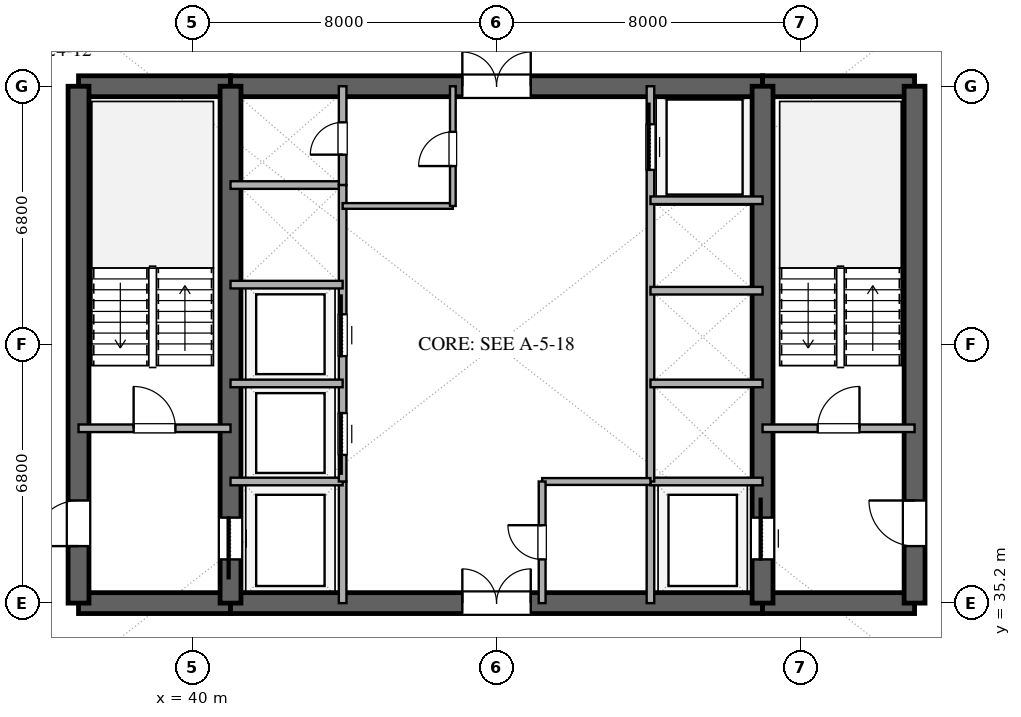
"""IFC4 building model, lengths in metres.
Left out: names, types, materials, properties, quantities, classifications, styles, units other than length and angle.
Written with IfcOpenShell. Run it as: python <this file> out.ifc"""

import sys

from ifc_helpers import new_model, si_unit, direction, frame, frame_2d, origin, place, context, subcontext, project, spatial, rectangle, extrude, element, fill, save


model = new_model("IFC4")
c1 = context("Model", 3, precision=1e-05, world=origin(), true_north=direction((0.0, 1.0)))
c2 = subcontext(c1, "Body", "Model", "MODEL_VIEW")
j1 = project(units=[si_unit("LENGTHUNIT", "METRE"), si_unit("PLANEANGLEUNIT", "RADIAN")], contexts=[c1])
p1 = place(None, origin())
s1 = spatial("IfcSite", under=j1, at=p1, CompositionType="ELEMENT")
p2 = place(p1, origin())
s2 = spatial("IfcBuilding", under=s1, at=p2, CompositionType="ELEMENT")
p3 = place(p2, frame((0.0, 0.0, 98.4)))
s3 = spatial("IfcBuildingStorey", under=s2, at=p3, CompositionType="ELEMENT", Elevation=98.4)
p4 = place(p3, frame((37.0, 35.2, 0.0), z_axis=(0.0, 0.0, 1.0), x_axis=(1.0, 0.0, 0.0)))
e1 = element("IfcWall", 1, at=p4, inside=s3, PredefinedType="SHEAR", context=c2, shape_type="SweptSolid", body=[
    extrude(rectangle(XDim=4.0, YDim=0.55, at=frame_2d((2.0, 0.0))), origin(), (0.0, 0.0, 1.0), 3.38),
])
p5 = place(p3, frame((41.0, 35.2, 0.0), z_axis=(0.0, 0.0, 1.0), x_axis=(1.0, 0.0, 0.0)))
e2 = element("IfcWall", 2, at=p5, inside=s3, PredefinedType="SHEAR", context=c2, shape_type="SweptSolid", body=[
    extrude(rectangle(XDim=14.0, YDim=0.55, at=frame_2d((7.0, 0.0))), origin(), (0.0, 0.0, 1.0), 3.38),
])
p6 = place(p5, frame((6.1, 0.0, 0.0)))
e3 = element("IfcOpeningElement", 3, at=p6, cuts=e2, PredefinedType="OPENING", context=c2, shape_type="SweptSolid", body=[
    extrude(rectangle(XDim=1.8, YDim=2.25, at=frame_2d((0.9, 1.125))), frame((0.0, 0.285, 0.0), z_axis=(0.0, -1.0, 0.0), x_axis=(1.0, 0.0, 0.0)), (0.0, 0.0, 1.0), 0.57),
])
for number, where, z_axis, x_axis in (
    (4, (55.0, 35.2, 0.0), (0.0, 0.0, 1.0), (1.0, 0.0, 0.0)),
    (5, (37.0, 48.8, 0.0), (0.0, 0.0, 1.0), (1.0, 0.0, 0.0)),
):
    element("IfcWall", number, at=place(p3, frame(where, z_axis=z_axis, x_axis=x_axis)), inside=s3, PredefinedType="SHEAR", context=c2, shape_type="SweptSolid", body=[
        extrude(rectangle(XDim=4.0, YDim=0.55, at=frame_2d((2.0, 0.0))), origin(), (0.0, 0.0, 1.0), 3.38),
    ])
p7 = place(p3, frame((41.0, 48.8, 0.0), z_axis=(0.0, 0.0, 1.0), x_axis=(1.0, 0.0, 0.0)))
e6 = element("IfcWall", 6, at=p7, inside=s3, PredefinedType="SHEAR", context=c2, shape_type="SweptSolid", body=[
    extrude(rectangle(XDim=14.0, YDim=0.55, at=frame_2d((7.0, 0.0))), origin(), (0.0, 0.0, 1.0), 3.38),
])
p8 = place(p7, frame((6.1, 0.0, 0.0)))
e7 = element("IfcOpeningElement", 7, at=p8, cuts=e6, PredefinedType="OPENING", context=c2, shape_type="SweptSolid", body=[
    extrude(rectangle(XDim=1.8, YDim=2.25, at=frame_2d((0.9, 1.125))), frame((0.0, 0.285, 0.0), z_axis=(0.0, -1.0, 0.0), x_axis=(1.0, 0.0, 0.0)), (0.0, 0.0, 1.0), 0.57),
])
p9 = place(p3, frame((55.0, 48.8, 0.0), z_axis=(0.0, 0.0, 1.0), x_axis=(1.0, 0.0, 0.0)))
e8 = element("IfcWall", 8, at=p9, inside=s3, PredefinedType="SHEAR", context=c2, shape_type="SweptSolid", body=[
    extrude(rectangle(XDim=4.0, YDim=0.55, at=frame_2d((2.0, 0.0))), origin(), (0.0, 0.0, 1.0), 3.38),
])
p10 = place(p3, frame((37.0, 35.2, 0.0), z_axis=(0.0, 0.0, 1.0), x_axis=(0.0, 1.0, 0.0)))
e9 = element("IfcWall", 9, at=p10, inside=s3, PredefinedType="SHEAR", context=c2, shape_type="SweptSolid", body=[
    extrude(rectangle(XDim=13.6, YDim=0.55, at=frame_2d((6.8, 0.0))), origin(), (0.0, 0.0, 1.0), 3.38),
])
p11 = place(p10, frame((1.5, 0.0, 0.0)))
e10 = element("IfcOpeningElement", 10, at=p11, cuts=e9, PredefinedType="OPENING", context=c2, shape_type="SweptSolid", body=[
    extrude(rectangle(XDim=1.2, YDim=2.15, at=frame_2d((0.6, 1.075))), frame((0.0, 0.285, 0.0), z_axis=(0.0, -1.0, 0.0), x_axis=(1.0, 0.0, 0.0)), (0.0, 0.0, 1.0), 0.57),
])
p12 = place(p3, frame((59.0, 35.2, 0.0), z_axis=(0.0, 0.0, 1.0), x_axis=(0.0, 1.0, 0.0)))
e11 = element("IfcWall", 11, at=p12, inside=s3, PredefinedType="SHEAR", context=c2, shape_type="SweptSolid", body=[
    extrude(rectangle(XDim=13.6, YDim=0.55, at=frame_2d((6.8, 0.0))), origin(), (0.0, 0.0, 1.0), 3.38),
])
p13 = place(p12, frame((1.5, 0.0, 0.0)))
e12 = element("IfcOpeningElement", 12, at=p13, cuts=e11, PredefinedType="OPENING", context=c2, shape_type="SweptSolid", body=[
    extrude(rectangle(XDim=1.2, YDim=2.15, at=frame_2d((0.6, 1.075))), frame((0.0, 0.285, 0.0), z_axis=(0.0, -1.0, 0.0), x_axis=(1.0, 0.0, 0.0)), (0.0, 0.0, 1.0), 0.57),
])
p14 = place(p3, frame((41.0, 35.2, 0.0), z_axis=(0.0, 0.0, 1.0), x_axis=(0.0, 1.0, 0.0)))
e13 = element("IfcWall", 13, at=p14, inside=s3, PredefinedType="SHEAR", context=c2, shape_type="SweptSolid", body=[
    extrude(rectangle(XDim=13.6, YDim=0.55, at=frame_2d((6.8, 0.0))), origin(), (0.0, 0.0, 1.0), 3.38),
])
p15 = place(p14, frame((1.15, 0.0, 0.0)))
e14 = element("IfcOpeningElement", 14, at=p15, cuts=e13, PredefinedType="OPENING", context=c2, shape_type="SweptSolid", body=[
    extrude(rectangle(XDim=1.1, YDim=2.2, at=frame_2d((0.55, 1.1))), frame((0.0, 0.285, 0.0), z_axis=(0.0, -1.0, 0.0), x_axis=(1.0, 0.0, 0.0)), (0.0, 0.0, 1.0), 0.57),
])
p16 = place(p3, frame((55.0, 35.2, 0.0), z_axis=(0.0, 0.0, 1.0), x_axis=(0.0, 1.0, 0.0)))
e15 = element("IfcWall", 15, at=p16, inside=s3, PredefinedType="SHEAR", context=c2, shape_type="SweptSolid", body=[
    extrude(rectangle(XDim=13.6, YDim=0.55, at=frame_2d((6.8, 0.0))), origin(), (0.0, 0.0, 1.0), 3.38),
])
p17 = place(p16, frame((1.15, 0.0, 0.0)))
e16 = element("IfcOpeningElement", 16, at=p17, cuts=e15, PredefinedType="OPENING", context=c2, shape_type="SweptSolid", body=[
    extrude(rectangle(XDim=1.1, YDim=2.2, at=frame_2d((0.55, 1.1))), frame((0.0, 0.285, 0.0), z_axis=(0.0, -1.0, 0.0), x_axis=(1.0, 0.0, 0.0)), (0.0, 0.0, 1.0), 0.57),
])
p18 = place(p3, frame((37.0, 39.8, 0.0), z_axis=(0.0, 0.0, 1.0), x_axis=(1.0, 0.0, 0.0)))
e17 = element("IfcWall", 17, at=p18, inside=s3, PredefinedType="SOLIDWALL", context=c2, shape_type="SweptSolid", body=[
    extrude(rectangle(XDim=4.0, YDim=0.2, at=frame_2d((2.0, 0.0))), origin(), (0.0, 0.0, 1.0), 2.74),
])
p19 = place(p18, frame((1.45, 0.0, 0.0)))
e18 = element("IfcOpeningElement", 18, at=p19, cuts=e17, PredefinedType="OPENING", context=c2, shape_type="SweptSolid", body=[
    extrude(rectangle(XDim=1.1, YDim=2.15, at=frame_2d((0.55, 1.075))), frame((0.0, 0.11, 0.0), z_axis=(0.0, -1.0, 0.0), x_axis=(1.0, 0.0, 0.0)), (0.0, 0.0, 1.0), 0.22),
])
p20 = place(p3, frame((55.0, 39.8, 0.0), z_axis=(0.0, 0.0, 1.0), x_axis=(1.0, 0.0, 0.0)))
e19 = element("IfcWall", 19, at=p20, inside=s3, PredefinedType="SOLIDWALL", context=c2, shape_type="SweptSolid", body=[
    extrude(rectangle(XDim=4.0, YDim=0.2, at=frame_2d((2.0, 0.0))), origin(), (0.0, 0.0, 1.0), 2.74),
])
p21 = place(p20, frame((1.45, 0.0, 0.0)))
e20 = element("IfcOpeningElement", 20, at=p21, cuts=e19, PredefinedType="OPENING", context=c2, shape_type="SweptSolid", body=[
    extrude(rectangle(XDim=1.1, YDim=2.15, at=frame_2d((0.55, 1.075))), frame((0.0, 0.11, 0.0), z_axis=(0.0, -1.0, 0.0), x_axis=(1.0, 0.0, 0.0)), (0.0, 0.0, 1.0), 0.22),
])
p22 = place(p3, frame((43.95, 35.2, 0.0), z_axis=(0.0, 0.0, 1.0), x_axis=(0.0, 1.0, 0.0)))
e21 = element("IfcWall", 21, at=p22, inside=s3, PredefinedType="SOLIDWALL", context=c2, shape_type="SweptSolid", body=[
    extrude(rectangle(XDim=3.2, YDim=0.2, at=frame_2d((1.6, 0.0))), origin(), (0.0, 0.0, 1.0), 2.74),
])
p23 = place(p3, frame((41.0, 38.4, 0.0), z_axis=(0.0, 0.0, 1.0), x_axis=(1.0, 0.0, 0.0)))
e22 = element("IfcWall", 22, at=p23, inside=s3, PredefinedType="SOLIDWALL", context=c2, shape_type="SweptSolid", body=[
    extrude(rectangle(XDim=2.95, YDim=0.2, at=frame_2d((1.475, 0.0))), origin(), (0.0, 0.0, 1.0), 2.74),
])
p24 = place(p3, frame((52.05, 35.2, 0.0), z_axis=(0.0, 0.0, 1.0), x_axis=(0.0, 1.0, 0.0)))
e23 = element("IfcWall", 23, at=p24, inside=s3, PredefinedType="SOLIDWALL", context=c2, shape_type="SweptSolid", body=[
    extrude(rectangle(XDim=3.2, YDim=0.2, at=frame_2d((1.6, 0.0))), origin(), (0.0, 0.0, 1.0), 2.74),
])
for number, where, z_axis, x_axis in (
    (24, (52.05, 38.4, 0.0), (0.0, 0.0, 1.0), (1.0, 0.0, 0.0)),
    (25, (41.0, 46.2, 0.0), (0.0, 0.0, 1.0), (1.0, 0.0, 0.0)),
):
    element("IfcWall", number, at=place(p3, frame(where, z_axis=z_axis, x_axis=x_axis)), inside=s3, PredefinedType="SOLIDWALL", context=c2, shape_type="SweptSolid", body=[
        extrude(rectangle(XDim=2.95, YDim=0.2, at=frame_2d((1.475, 0.0))), origin(), (0.0, 0.0, 1.0), 2.74),
    ])
p25 = place(p3, frame((43.95, 46.2, 0.0), z_axis=(0.0, 0.0, 1.0), x_axis=(0.0, 1.0, 0.0)))
e26 = element("IfcWall", 26, at=p25, inside=s3, PredefinedType="SOLIDWALL", context=c2, shape_type="SweptSolid", body=[
    extrude(rectangle(XDim=2.6, YDim=0.2, at=frame_2d((1.3, 0.0))), origin(), (0.0, 0.0, 1.0), 2.74),
])
p26 = place(p25, frame((0.8, 0.0, 0.0)))
e27 = element("IfcOpeningElement", 27, at=p26, cuts=e26, PredefinedType="OPENING", context=c2, shape_type="SweptSolid", body=[
    extrude(rectangle(XDim=0.85, YDim=2.15, at=frame_2d((0.425, 1.075))), frame((0.0, 0.11, 0.0), z_axis=(0.0, -1.0, 0.0), x_axis=(1.0, 0.0, 0.0)), (0.0, 0.0, 1.0), 0.22),
])
p27 = place(p3, frame((43.95, 38.4, 0.0), z_axis=(0.0, 0.0, 1.0), x_axis=(0.0, 1.0, 0.0)))
e28 = element("IfcWall", 28, at=p27, inside=s3, PredefinedType="SOLIDWALL", context=c2, shape_type="SweptSolid", body=[
    extrude(rectangle(XDim=7.8, YDim=0.2, at=frame_2d((3.9, 0.0))), origin(), (0.0, 0.0, 1.0), 2.74),
])
p28 = place(p27, frame((0.7, 0.0, 0.0)))
e29 = element("IfcOpeningElement", 29, at=p28, cuts=e28, PredefinedType="OPENING", context=c2, shape_type="SweptSolid", body=[
    extrude(rectangle(XDim=1.1, YDim=2.2, at=frame_2d((0.55, 1.1))), frame((0.0, 0.11, 0.0), z_axis=(0.0, -1.0, 0.0), x_axis=(1.0, 0.0, 0.0)), (0.0, 0.0, 1.0), 0.22),
])
p29 = place(p27, frame((3.3, 0.0, 0.0)))
e30 = element("IfcOpeningElement", 30, at=p29, cuts=e28, PredefinedType="OPENING", context=c2, shape_type="SweptSolid", body=[
    extrude(rectangle(XDim=1.1, YDim=2.2, at=frame_2d((0.55, 1.1))), frame((0.0, 0.11, 0.0), z_axis=(0.0, -1.0, 0.0), x_axis=(1.0, 0.0, 0.0)), (0.0, 0.0, 1.0), 0.22),
])
for number, where, z_axis, x_axis in (
    (31, (41.0, 40.98, 0.0), (0.0, 0.0, 1.0), (1.0, 0.0, 0.0)),
    (32, (41.0, 43.58, 0.0), (0.0, 0.0, 1.0), (1.0, 0.0, 0.0)),
):
    element("IfcWall", number, at=place(p3, frame(where, z_axis=z_axis, x_axis=x_axis)), inside=s3, PredefinedType="SOLIDWALL", context=c2, shape_type="SweptSolid", body=[
        extrude(rectangle(XDim=2.95, YDim=0.2, at=frame_2d((1.475, 0.0))), origin(), (0.0, 0.0, 1.0), 2.74),
    ])
p30 = place(p3, frame((52.05, 38.4, 0.0), z_axis=(0.0, 0.0, 1.0), x_axis=(0.0, 1.0, 0.0)))
e33 = element("IfcWall", 33, at=p30, inside=s3, PredefinedType="SOLIDWALL", context=c2, shape_type="SweptSolid", body=[
    extrude(rectangle(XDim=10.4, YDim=0.2, at=frame_2d((5.2, 0.0))), origin(), (0.0, 0.0, 1.0), 2.74),
])
p31 = place(p30, frame((8.2, 0.0, 0.0)))
e34 = element("IfcOpeningElement", 34, at=p31, cuts=e33, PredefinedType="OPENING", context=c2, shape_type="SweptSolid", body=[
    extrude(rectangle(XDim=1.2, YDim=2.2, at=frame_2d((0.6, 1.1))), frame((0.0, 0.11, 0.0), z_axis=(0.0, -1.0, 0.0), x_axis=(1.0, 0.0, 0.0)), (0.0, 0.0, 1.0), 0.22),
])
for number, where, z_axis, x_axis in (
    (35, (52.05, 40.98, 0.0), (0.0, 0.0, 1.0), (1.0, 0.0, 0.0)),
    (36, (52.05, 43.42, 0.0), (0.0, 0.0, 1.0), (1.0, 0.0, 0.0)),
    (37, (52.05, 45.8, 0.0), (0.0, 0.0, 1.0), (1.0, 0.0, 0.0)),
):
    element("IfcWall", number, at=place(p3, frame(where, z_axis=z_axis, x_axis=x_axis)), inside=s3, PredefinedType="SOLIDWALL", context=c2, shape_type="SweptSolid", body=[
        extrude(rectangle(XDim=2.95, YDim=0.2, at=frame_2d((1.475, 0.0))), origin(), (0.0, 0.0, 1.0), 2.74),
    ])
p32 = place(p3, frame((43.95, 45.65, 0.0), z_axis=(0.0, 0.0, 1.0), x_axis=(1.0, 0.0, 0.0)))
e38 = element("IfcWall", 38, at=p32, inside=s3, PredefinedType="PARTITIONING", context=c2, shape_type="SweptSolid", body=[
    extrude(rectangle(XDim=2.9, YDim=0.15, at=frame_2d((1.45, 0.0))), origin(), (0.0, 0.0, 1.0), 2.74),
])
p33 = place(p3, frame((46.85, 45.65, 0.0), z_axis=(0.0, 0.0, 1.0), x_axis=(0.0, 1.0, 0.0)))
e39 = element("IfcWall", 39, at=p33, inside=s3, PredefinedType="PARTITIONING", context=c2, shape_type="SweptSolid", body=[
    extrude(rectangle(XDim=3.15, YDim=0.15, at=frame_2d((1.575, 0.0))), origin(), (0.0, 0.0, 1.0), 2.74),
])
p34 = place(p33, frame((1.05, 0.0, 0.0)))
e40 = element("IfcOpeningElement", 40, at=p34, cuts=e39, PredefinedType="OPENING", context=c2, shape_type="SweptSolid", body=[
    extrude(rectangle(XDim=0.9, YDim=2.15, at=frame_2d((0.45, 1.075))), frame((0.0, 0.085, 0.0), z_axis=(0.0, -1.0, 0.0), x_axis=(1.0, 0.0, 0.0)), (0.0, 0.0, 1.0), 0.17),
])
p35 = place(p3, frame((49.2, 38.4, 0.0), z_axis=(0.0, 0.0, 1.0), x_axis=(1.0, 0.0, 0.0)))
e41 = element("IfcWall", 41, at=p35, inside=s3, PredefinedType="PLUMBINGWALL", context=c2, shape_type="SweptSolid", body=[
    extrude(rectangle(XDim=2.85, YDim=0.18, at=frame_2d((1.425, 0.0))), origin(), (0.0, 0.0, 1.0), 2.74),
])
p36 = place(p3, frame((49.2, 35.2, 0.0), z_axis=(0.0, 0.0, 1.0), x_axis=(0.0, 1.0, 0.0)))
e42 = element("IfcWall", 42, at=p36, inside=s3, PredefinedType="PLUMBINGWALL", context=c2, shape_type="SweptSolid", body=[
    extrude(rectangle(XDim=3.2, YDim=0.18, at=frame_2d((1.6, 0.0))), origin(), (0.0, 0.0, 1.0), 2.74),
])
p37 = place(p36, frame((1.15, 0.0, 0.0)))
e43 = element("IfcOpeningElement", 43, at=p37, cuts=e42, PredefinedType="OPENING", context=c2, shape_type="SweptSolid", body=[
    extrude(rectangle(XDim=0.9, YDim=2.1, at=frame_2d((0.45, 1.05))), frame((0.0, 0.1, 0.0), z_axis=(0.0, -1.0, 0.0), x_axis=(1.0, 0.0, 0.0)), (0.0, 0.0, 1.0), 0.2),
])
p38 = place(p15, origin())
e44 = element("IfcDoor", 44, at=p38, inside=s3, OperationType="SLIDING_TO_LEFT", PredefinedType="DOOR", context=c2, shape_type="SweptSolid", body=[
    extrude(rectangle(XDim=1.1, YDim=2.2, at=frame_2d((0.55, 1.1))), frame((0.0, 0.025, 0.0), z_axis=(0.0, -1.0, 0.0), x_axis=(1.0, 0.0, 0.0)), (0.0, 0.0, 1.0), 0.05),
])
fill(e14, e44)
p39 = place(p17, origin())
e45 = element("IfcDoor", 45, at=p39, inside=s3, OperationType="SLIDING_TO_RIGHT", PredefinedType="DOOR", context=c2, shape_type="SweptSolid", body=[
    extrude(rectangle(XDim=1.1, YDim=2.2, at=frame_2d((0.55, 1.1))), frame((0.0, 0.025, 0.0), z_axis=(0.0, -1.0, 0.0), x_axis=(1.0, 0.0, 0.0)), (0.0, 0.0, 1.0), 0.05),
])
fill(e16, e45)
p40 = place(p11, origin())
e46 = element("IfcDoor", 46, at=p40, inside=s3, OperationType="SINGLE_SWING_LEFT", PredefinedType="DOOR", context=c2, shape_type="SweptSolid", body=[
    extrude(rectangle(XDim=1.2, YDim=2.15, at=frame_2d((0.6, 1.075))), frame((0.0, 0.025, 0.0), z_axis=(0.0, -1.0, 0.0), x_axis=(1.0, 0.0, 0.0)), (0.0, 0.0, 1.0), 0.05),
])
fill(e10, e46)
p41 = place(p13, origin())
e47 = element("IfcDoor", 47, at=p41, inside=s3, OperationType="SINGLE_SWING_RIGHT", PredefinedType="DOOR", context=c2, shape_type="SweptSolid", body=[
    extrude(rectangle(XDim=1.2, YDim=2.15, at=frame_2d((0.6, 1.075))), frame((0.0, 0.025, 0.0), z_axis=(0.0, -1.0, 0.0), x_axis=(1.0, 0.0, 0.0)), (0.0, 0.0, 1.0), 0.05),
])
fill(e12, e47)
p42 = place(p6, origin())
e48 = element("IfcDoor", 48, at=p42, inside=s3, OperationType="DOUBLE_DOOR_SINGLE_SWING", PredefinedType="DOOR", context=c2, shape_type="SweptSolid", body=[
    extrude(rectangle(XDim=1.8, YDim=2.25, at=frame_2d((0.9, 1.125))), frame((0.0, 0.025, 0.0), z_axis=(0.0, -1.0, 0.0), x_axis=(1.0, 0.0, 0.0)), (0.0, 0.0, 1.0), 0.05),
])
fill(e3, e48)
p43 = place(p8, origin())
e49 = element("IfcDoor", 49, at=p43, inside=s3, OperationType="DOUBLE_DOOR_SINGLE_SWING", PredefinedType="DOOR", context=c2, shape_type="SweptSolid", body=[
    extrude(rectangle(XDim=1.8, YDim=2.25, at=frame_2d((0.9, 1.125))), frame((0.0, 0.025, 0.0), z_axis=(0.0, -1.0, 0.0), x_axis=(1.0, 0.0, 0.0)), (0.0, 0.0, 1.0), 0.05),
])
fill(e7, e49)
p44 = place(p19, origin())
e50 = element("IfcDoor", 50, at=p44, inside=s3, OperationType="SINGLE_SWING_LEFT", PredefinedType="DOOR", context=c2, shape_type="SweptSolid", body=[
    extrude(rectangle(XDim=1.1, YDim=2.15, at=frame_2d((0.55, 1.075))), frame((0.0, 0.025, 0.0), z_axis=(0.0, -1.0, 0.0), x_axis=(1.0, 0.0, 0.0)), (0.0, 0.0, 1.0), 0.05),
])
fill(e18, e50)
p45 = place(p21, origin())
e51 = element("IfcDoor", 51, at=p45, inside=s3, OperationType="SINGLE_SWING_RIGHT", PredefinedType="DOOR", context=c2, shape_type="SweptSolid", body=[
    extrude(rectangle(XDim=1.1, YDim=2.15, at=frame_2d((0.55, 1.075))), frame((0.0, 0.025, 0.0), z_axis=(0.0, -1.0, 0.0), x_axis=(1.0, 0.0, 0.0)), (0.0, 0.0, 1.0), 0.05),
])
fill(e20, e51)
p46 = place(p26, origin())
e52 = element("IfcDoor", 52, at=p46, inside=s3, OperationType="SINGLE_SWING_LEFT", PredefinedType="DOOR", context=c2, shape_type="SweptSolid", body=[
    extrude(rectangle(XDim=0.85, YDim=2.15, at=frame_2d((0.425, 1.075))), frame((0.0, 0.025, 0.0), z_axis=(0.0, -1.0, 0.0), x_axis=(1.0, 0.0, 0.0)), (0.0, 0.0, 1.0), 0.05),
])
fill(e27, e52)
p47 = place(p28, origin())
e53 = element("IfcDoor", 53, at=p47, inside=s3, OperationType="SLIDING_TO_LEFT", PredefinedType="DOOR", context=c2, shape_type="SweptSolid", body=[
    extrude(rectangle(XDim=1.1, YDim=2.2, at=frame_2d((0.55, 1.1))), frame((0.0, 0.025, 0.0), z_axis=(0.0, -1.0, 0.0), x_axis=(1.0, 0.0, 0.0)), (0.0, 0.0, 1.0), 0.05),
])
fill(e29, e53)
p48 = place(p29, origin())
e54 = element("IfcDoor", 54, at=p48, inside=s3, OperationType="SLIDING_TO_RIGHT", PredefinedType="DOOR", context=c2, shape_type="SweptSolid", body=[
    extrude(rectangle(XDim=1.1, YDim=2.2, at=frame_2d((0.55, 1.1))), frame((0.0, 0.025, 0.0), z_axis=(0.0, -1.0, 0.0), x_axis=(1.0, 0.0, 0.0)), (0.0, 0.0, 1.0), 0.05),
])
fill(e30, e54)
p49 = place(p31, origin())
e55 = element("IfcDoor", 55, at=p49, inside=s3, OperationType="SLIDING_TO_RIGHT", PredefinedType="DOOR", context=c2, shape_type="SweptSolid", body=[
    extrude(rectangle(XDim=1.2, YDim=2.2, at=frame_2d((0.6, 1.1))), frame((0.0, 0.025, 0.0), z_axis=(0.0, -1.0, 0.0), x_axis=(1.0, 0.0, 0.0)), (0.0, 0.0, 1.0), 0.05),
])
fill(e34, e55)
p50 = place(p34, origin())
e56 = element("IfcDoor", 56, at=p50, inside=s3, OperationType="SINGLE_SWING_LEFT", PredefinedType="DOOR", context=c2, shape_type="SweptSolid", body=[
    extrude(rectangle(XDim=0.9, YDim=2.15, at=frame_2d((0.45, 1.075))), frame((0.0, 0.025, 0.0), z_axis=(0.0, -1.0, 0.0), x_axis=(1.0, 0.0, 0.0)), (0.0, 0.0, 1.0), 0.05),
])
fill(e40, e56)
p51 = place(p37, origin())
e57 = element("IfcDoor", 57, at=p51, inside=s3, OperationType="SINGLE_SWING_RIGHT", PredefinedType="DOOR", context=c2, shape_type="SweptSolid", body=[
    extrude(rectangle(XDim=0.9, YDim=2.1, at=frame_2d((0.45, 1.05))), frame((0.0, 0.025, 0.0), z_axis=(0.0, -1.0, 0.0), x_axis=(1.0, 0.0, 0.0)), (0.0, 0.0, 1.0), 0.05),
])
fill(e43, e57)
save(model, sys.argv[1])
